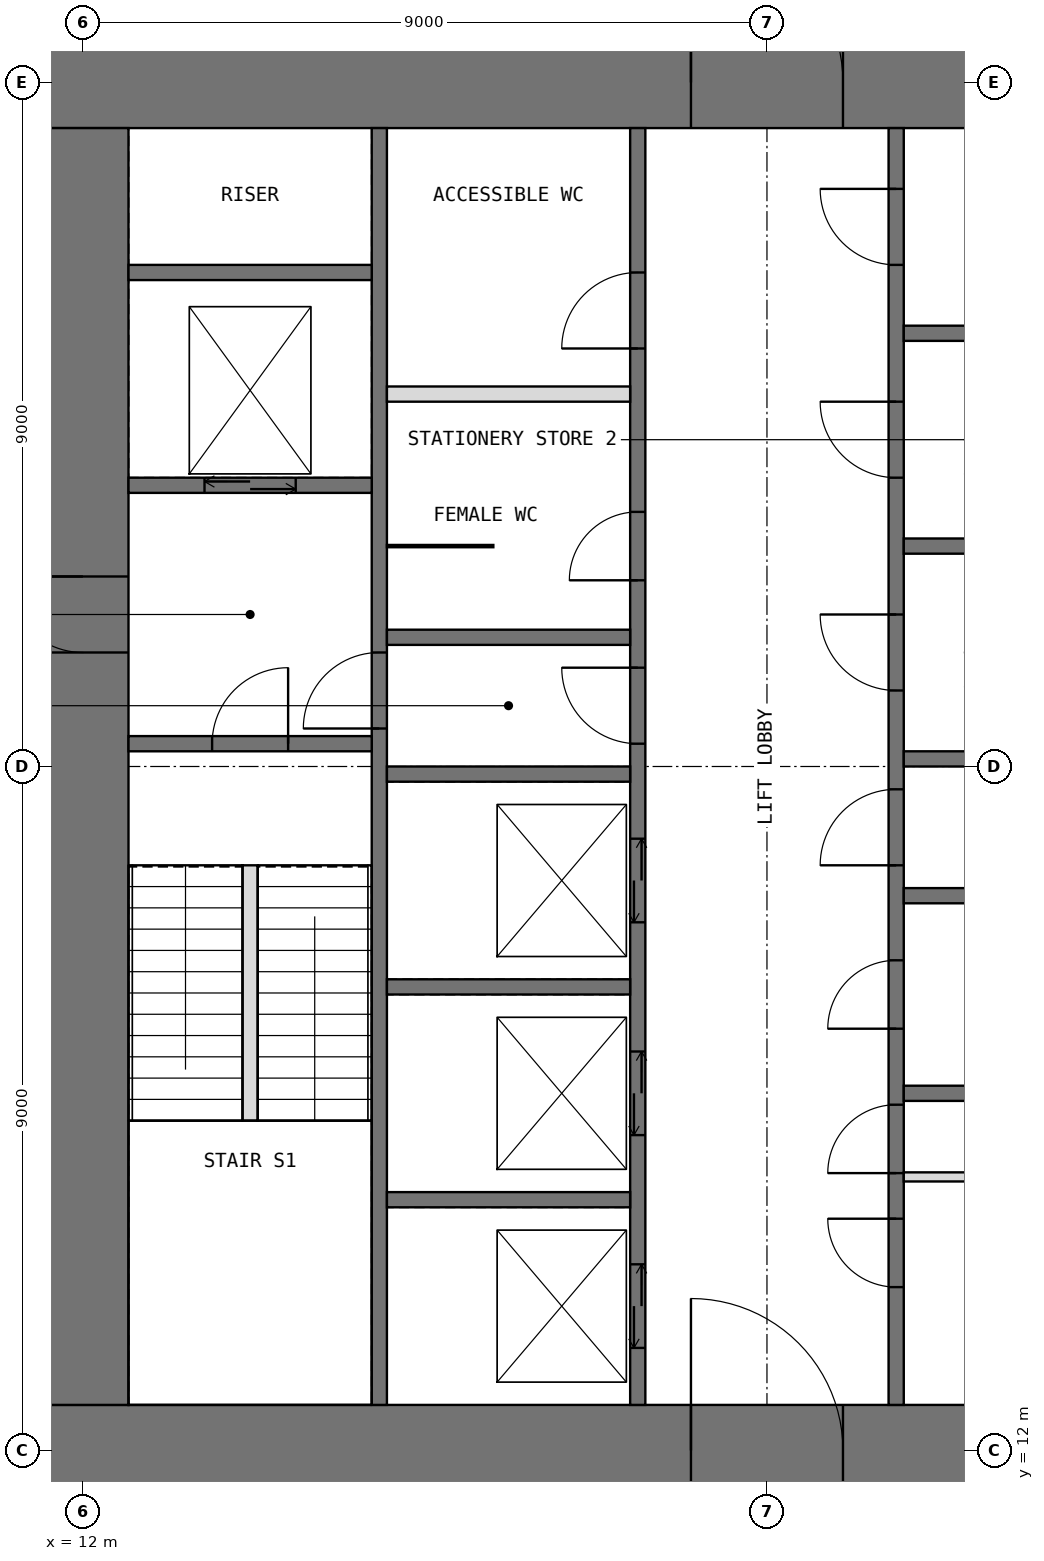
"""IFC4 building model, lengths in metres.
Left out: names, types, materials, properties, quantities, classifications, styles, units other than length and angle.
Written with IfcOpenShell. Run it as: python <this file> out.ifc"""

import sys

from ifc_helpers import new_model, si_unit, direction, frame, frame_2d, origin, place, context, subcontext, project, spatial, rectangle, extrude, element, fill, save


model = new_model("IFC4")
c1 = context("Model", 3, precision=1e-05, world=origin(), true_north=direction((0.0, 1.0)))
c2 = subcontext(c1, "Body", "Model", "MODEL_VIEW")
j1 = project(units=[si_unit("LENGTHUNIT", "METRE"), si_unit("PLANEANGLEUNIT", "RADIAN")], contexts=[c1])
p1 = place(None, origin())
s1 = spatial("IfcSite", under=j1, at=p1, CompositionType="ELEMENT")
p2 = place(p1, origin())
s2 = spatial("IfcBuilding", under=s1, at=p2, CompositionType="ELEMENT")
p3 = place(p2, frame((0.0, 0.0, 244.0)))
s3 = spatial("IfcBuildingStorey", under=s2, at=p3, CompositionType="ELEMENT", Elevation=244.0)
p4 = place(p3, frame((11.4, 12.0, -0.05), z_axis=(0.0, 0.0, 1.0), x_axis=(1.0, 0.0, 0.0)))
e1 = element("IfcWall", 1, at=p4, inside=s3, PredefinedType="SHEAR", context=c2, shape_type="SweptSolid", body=[
    extrude(rectangle(XDim=19.2, YDim=1.2, at=frame_2d((9.6, 0.0))), origin(), (0.0, 0.0, 1.0), 4.2),
])
p5 = place(p4, frame((8.6, 0.0, 0.05)))
e2 = element("IfcOpeningElement", 2, at=p5, cuts=e1, PredefinedType="OPENING", context=c2, shape_type="SweptSolid", body=[
    extrude(rectangle(XDim=2.0, YDim=2.2, at=frame_2d((1.0, 1.1))), frame((0.0, 0.61, 0.0), z_axis=(0.0, -1.0, 0.0), x_axis=(1.0, 0.0, 0.0)), (0.0, 0.0, 1.0), 1.22),
])
p6 = place(p3, frame((11.4, 30.0, -0.05), z_axis=(0.0, 0.0, 1.0), x_axis=(1.0, 0.0, 0.0)))
e3 = element("IfcWall", 3, at=p6, inside=s3, PredefinedType="SHEAR", context=c2, shape_type="SweptSolid", body=[
    extrude(rectangle(XDim=19.2, YDim=1.2, at=frame_2d((9.6, 0.0))), origin(), (0.0, 0.0, 1.0), 4.2),
])
p7 = place(p6, frame((8.6, 0.0, 0.05)))
e4 = element("IfcOpeningElement", 4, at=p7, cuts=e3, PredefinedType="OPENING", context=c2, shape_type="SweptSolid", body=[
    extrude(rectangle(XDim=2.0, YDim=2.2, at=frame_2d((1.0, 1.1))), frame((0.0, 0.61, 0.0), z_axis=(0.0, -1.0, 0.0), x_axis=(1.0, 0.0, 0.0)), (0.0, 0.0, 1.0), 1.22),
])
p8 = place(p3, frame((12.0, 12.6, -0.05), z_axis=(0.0, 0.0, 1.0), x_axis=(0.0, 1.0, 0.0)))
e5 = element("IfcWall", 5, at=p8, inside=s3, PredefinedType="SHEAR", context=c2, shape_type="SweptSolid", body=[
    extrude(rectangle(XDim=16.8, YDim=1.2, at=frame_2d((8.4, 0.0))), origin(), (0.0, 0.0, 1.0), 4.2),
])
p9 = place(p8, frame((9.9, 0.0, 0.05)))
e6 = element("IfcOpeningElement", 6, at=p9, cuts=e5, PredefinedType="OPENING", context=c2, shape_type="SweptSolid", body=[
    extrude(rectangle(XDim=1.0, YDim=2.2, at=frame_2d((0.5, 1.1))), frame((0.0, 0.61, 0.0), z_axis=(0.0, -1.0, 0.0), x_axis=(1.0, 0.0, 0.0)), (0.0, 0.0, 1.0), 1.22),
])
p10 = place(p3, frame((15.9, 12.6, -0.05), z_axis=(0.0, 0.0, 1.0), x_axis=(0.0, 1.0, 0.0)))
e7 = element("IfcWall", 7, at=p10, inside=s3, PredefinedType="SHEAR", context=c2, shape_type="SweptSolid", body=[
    extrude(rectangle(XDim=16.8, YDim=0.2, at=frame_2d((8.4, 0.0))), origin(), (0.0, 0.0, 1.0), 4.2),
])
p11 = place(p10, frame((8.9, 0.0, 0.05)))
e8 = element("IfcOpeningElement", 8, at=p11, cuts=e7, PredefinedType="OPENING", context=c2, shape_type="SweptSolid", body=[
    extrude(rectangle(XDim=1.0, YDim=2.2, at=frame_2d((0.5, 1.1))), frame((0.0, 0.11, 0.0), z_axis=(0.0, -1.0, 0.0), x_axis=(1.0, 0.0, 0.0)), (0.0, 0.0, 1.0), 0.22),
])
p12 = place(p3, frame((19.3, 12.6, -0.05), z_axis=(0.0, 0.0, 1.0), x_axis=(0.0, 1.0, 0.0)))
e9 = element("IfcWall", 9, at=p12, inside=s3, PredefinedType="SHEAR", context=c2, shape_type="SweptSolid", body=[
    extrude(rectangle(XDim=16.8, YDim=0.2, at=frame_2d((8.4, 0.0))), origin(), (0.0, 0.0, 1.0), 4.2),
])
p13 = place(p12, frame((8.7, 0.0, 0.05)))
e10 = element("IfcOpeningElement", 10, at=p13, cuts=e9, PredefinedType="OPENING", context=c2, shape_type="SweptSolid", body=[
    extrude(rectangle(XDim=1.0, YDim=2.2, at=frame_2d((0.5, 1.1))), frame((0.0, 0.11, 0.0), z_axis=(0.0, -1.0, 0.0), x_axis=(1.0, 0.0, 0.0)), (0.0, 0.0, 1.0), 0.22),
])
p14 = place(p12, frame((10.85, 0.0, 0.05)))
e11 = element("IfcOpeningElement", 11, at=p14, cuts=e9, PredefinedType="OPENING", context=c2, shape_type="SweptSolid", body=[
    extrude(rectangle(XDim=0.9, YDim=2.2, at=frame_2d((0.45, 1.1))), frame((0.0, 0.11, 0.0), z_axis=(0.0, -1.0, 0.0), x_axis=(1.0, 0.0, 0.0)), (0.0, 0.0, 1.0), 0.22),
])
p15 = place(p12, frame((13.9, 0.0, 0.05)))
e12 = element("IfcOpeningElement", 12, at=p15, cuts=e9, PredefinedType="OPENING", context=c2, shape_type="SweptSolid", body=[
    extrude(rectangle(XDim=1.0, YDim=2.2, at=frame_2d((0.5, 1.1))), frame((0.0, 0.11, 0.0), z_axis=(0.0, -1.0, 0.0), x_axis=(1.0, 0.0, 0.0)), (0.0, 0.0, 1.0), 0.22),
])
p16 = place(p12, frame((0.75, 0.0, 0.05)))
e13 = element("IfcOpeningElement", 13, at=p16, cuts=e9, PredefinedType="OPENING", context=c2, shape_type="SweptSolid", body=[
    extrude(rectangle(XDim=1.1, YDim=2.2, at=frame_2d((0.55, 1.1))), frame((0.0, 0.11, 0.0), z_axis=(0.0, -1.0, 0.0), x_axis=(1.0, 0.0, 0.0)), (0.0, 0.0, 1.0), 0.22),
])
p17 = place(p12, frame((3.55, 0.0, 0.05)))
e14 = element("IfcOpeningElement", 14, at=p17, cuts=e9, PredefinedType="OPENING", context=c2, shape_type="SweptSolid", body=[
    extrude(rectangle(XDim=1.1, YDim=2.2, at=frame_2d((0.55, 1.1))), frame((0.0, 0.11, 0.0), z_axis=(0.0, -1.0, 0.0), x_axis=(1.0, 0.0, 0.0)), (0.0, 0.0, 1.0), 0.22),
])
p18 = place(p12, frame((6.35, 0.0, 0.05)))
e15 = element("IfcOpeningElement", 15, at=p18, cuts=e9, PredefinedType="OPENING", context=c2, shape_type="SweptSolid", body=[
    extrude(rectangle(XDim=1.1, YDim=2.2, at=frame_2d((0.55, 1.1))), frame((0.0, 0.11, 0.0), z_axis=(0.0, -1.0, 0.0), x_axis=(1.0, 0.0, 0.0)), (0.0, 0.0, 1.0), 0.22),
])
p19 = place(p3, frame((22.7, 12.6, -0.05), z_axis=(0.0, 0.0, 1.0), x_axis=(0.0, 1.0, 0.0)))
e16 = element("IfcWall", 16, at=p19, inside=s3, PredefinedType="SHEAR", context=c2, shape_type="SweptSolid", body=[
    extrude(rectangle(XDim=16.8, YDim=0.2, at=frame_2d((8.4, 0.0))), origin(), (0.0, 0.0, 1.0), 4.2),
])
p20 = place(p19, frame((3.05, 0.0, 0.05)))
e17 = element("IfcOpeningElement", 17, at=p20, cuts=e16, PredefinedType="OPENING", context=c2, shape_type="SweptSolid", body=[
    extrude(rectangle(XDim=0.9, YDim=2.2, at=frame_2d((0.45, 1.1))), frame((0.0, 0.11, 0.0), z_axis=(0.0, -1.0, 0.0), x_axis=(1.0, 0.0, 0.0)), (0.0, 0.0, 1.0), 0.22),
])
p21 = place(p19, frame((7.1, 0.0, 0.05)))
e18 = element("IfcOpeningElement", 18, at=p21, cuts=e16, PredefinedType="OPENING", context=c2, shape_type="SweptSolid", body=[
    extrude(rectangle(XDim=1.0, YDim=2.2, at=frame_2d((0.5, 1.1))), frame((0.0, 0.11, 0.0), z_axis=(0.0, -1.0, 0.0), x_axis=(1.0, 0.0, 0.0)), (0.0, 0.0, 1.0), 0.22),
])
p22 = place(p19, frame((1.55, 0.0, 0.05)))
e19 = element("IfcOpeningElement", 19, at=p22, cuts=e16, PredefinedType="OPENING", context=c2, shape_type="SweptSolid", body=[
    extrude(rectangle(XDim=0.9, YDim=2.2, at=frame_2d((0.45, 1.1))), frame((0.0, 0.11, 0.0), z_axis=(0.0, -1.0, 0.0), x_axis=(1.0, 0.0, 0.0)), (0.0, 0.0, 1.0), 0.22),
])
p23 = place(p19, frame((4.95, 0.0, 0.05)))
e20 = element("IfcOpeningElement", 20, at=p23, cuts=e16, PredefinedType="OPENING", context=c2, shape_type="SweptSolid", body=[
    extrude(rectangle(XDim=0.9, YDim=2.2, at=frame_2d((0.45, 1.1))), frame((0.0, 0.11, 0.0), z_axis=(0.0, -1.0, 0.0), x_axis=(1.0, 0.0, 0.0)), (0.0, 0.0, 1.0), 0.22),
])
p24 = place(p19, frame((9.4, 0.0, 0.05)))
e21 = element("IfcOpeningElement", 21, at=p24, cuts=e16, PredefinedType="OPENING", context=c2, shape_type="SweptSolid", body=[
    extrude(rectangle(XDim=1.0, YDim=2.2, at=frame_2d((0.5, 1.1))), frame((0.0, 0.11, 0.0), z_axis=(0.0, -1.0, 0.0), x_axis=(1.0, 0.0, 0.0)), (0.0, 0.0, 1.0), 0.22),
])
p25 = place(p19, frame((12.2, 0.0, 0.05)))
e22 = element("IfcOpeningElement", 22, at=p25, cuts=e16, PredefinedType="OPENING", context=c2, shape_type="SweptSolid", body=[
    extrude(rectangle(XDim=1.0, YDim=2.2, at=frame_2d((0.5, 1.1))), frame((0.0, 0.11, 0.0), z_axis=(0.0, -1.0, 0.0), x_axis=(1.0, 0.0, 0.0)), (0.0, 0.0, 1.0), 0.22),
])
p26 = place(p19, frame((15.0, 0.0, 0.05)))
e23 = element("IfcOpeningElement", 23, at=p26, cuts=e16, PredefinedType="OPENING", context=c2, shape_type="SweptSolid", body=[
    extrude(rectangle(XDim=1.0, YDim=2.2, at=frame_2d((0.5, 1.1))), frame((0.0, 0.11, 0.0), z_axis=(0.0, -1.0, 0.0), x_axis=(1.0, 0.0, 0.0)), (0.0, 0.0, 1.0), 0.22),
])
p27 = place(p3, frame((12.6, 21.3, -0.05), z_axis=(0.0, 0.0, 1.0), x_axis=(1.0, 0.0, 0.0)))
e24 = element("IfcWall", 24, at=p27, inside=s3, PredefinedType="SHEAR", context=c2, shape_type="SweptSolid", body=[
    extrude(rectangle(XDim=3.2, YDim=0.2, at=frame_2d((1.6, 0.0))), origin(), (0.0, 0.0, 1.0), 4.2),
])
p28 = place(p27, frame((1.1, 0.0, 0.05)))
e25 = element("IfcOpeningElement", 25, at=p28, cuts=e24, PredefinedType="OPENING", context=c2, shape_type="SweptSolid", body=[
    extrude(rectangle(XDim=1.0, YDim=2.2, at=frame_2d((0.5, 1.1))), frame((0.0, 0.11, 0.0), z_axis=(0.0, -1.0, 0.0), x_axis=(1.0, 0.0, 0.0)), (0.0, 0.0, 1.0), 0.22),
])
p29 = place(p3, frame((12.6, 24.7, -0.05), z_axis=(0.0, 0.0, 1.0), x_axis=(1.0, 0.0, 0.0)))
e26 = element("IfcWall", 26, at=p29, inside=s3, PredefinedType="SHEAR", context=c2, shape_type="SweptSolid", body=[
    extrude(rectangle(XDim=3.2, YDim=0.2, at=frame_2d((1.6, 0.0))), origin(), (0.0, 0.0, 1.0), 4.2),
])
p30 = place(p29, frame((1.0, 0.0, 0.05)))
e27 = element("IfcOpeningElement", 27, at=p30, cuts=e26, PredefinedType="OPENING", context=c2, shape_type="SweptSolid", body=[
    extrude(rectangle(XDim=1.2, YDim=2.2, at=frame_2d((0.6, 1.1))), frame((0.0, 0.11, 0.0), z_axis=(0.0, -1.0, 0.0), x_axis=(1.0, 0.0, 0.0)), (0.0, 0.0, 1.0), 0.22),
])
for number, where, z_axis, x_axis in (
    (28, (12.6, 27.5, -0.05), (0.0, 0.0, 1.0), (1.0, 0.0, 0.0)),
    (29, (16.0, 15.3, -0.05), (0.0, 0.0, 1.0), (1.0, 0.0, 0.0)),
    (30, (16.0, 18.1, -0.05), (0.0, 0.0, 1.0), (1.0, 0.0, 0.0)),
    (31, (16.0, 20.9, -0.05), (0.0, 0.0, 1.0), (1.0, 0.0, 0.0)),
    (32, (16.0, 22.7, -0.05), (0.0, 0.0, 1.0), (1.0, 0.0, 0.0)),
):
    element("IfcWall", number, at=place(p3, frame(where, z_axis=z_axis, x_axis=x_axis)), inside=s3, PredefinedType="SHEAR", context=c2, shape_type="SweptSolid", body=[
        extrude(rectangle(XDim=3.2, YDim=0.2, at=frame_2d((1.6, 0.0))), origin(), (0.0, 0.0, 1.0), 4.2),
    ])
p31 = place(p3, frame((16.0, 25.9, 0.0), z_axis=(0.0, 0.0, 1.0), x_axis=(1.0, 0.0, 0.0)))
e33 = element("IfcWall", 33, at=p31, inside=s3, PredefinedType="PARTITIONING", context=c2, shape_type="SweptSolid", body=[
    extrude(rectangle(XDim=3.2, YDim=0.2, at=frame_2d((1.6, 0.0))), origin(), (0.0, 0.0, 1.0), 3.95),
])
for number, where, z_axis, x_axis in (
    (34, (22.8, 16.7, -0.05), (0.0, 0.0, 1.0), (1.0, 0.0, 0.0)),
    (35, (22.8, 19.3, -0.05), (0.0, 0.0, 1.0), (1.0, 0.0, 0.0)),
    (36, (22.8, 21.1, -0.05), (0.0, 0.0, 1.0), (1.0, 0.0, 0.0)),
    (37, (22.8, 23.9, -0.05), (0.0, 0.0, 1.0), (1.0, 0.0, 0.0)),
    (38, (22.8, 26.7, -0.05), (0.0, 0.0, 1.0), (1.0, 0.0, 0.0)),
):
    element("IfcWall", number, at=place(p3, frame(where, z_axis=z_axis, x_axis=x_axis)), inside=s3, PredefinedType="SHEAR", context=c2, shape_type="SweptSolid", body=[
        extrude(rectangle(XDim=3.2, YDim=0.2, at=frame_2d((1.6, 0.0))), origin(), (0.0, 0.0, 1.0), 4.2),
    ])
p32 = place(p3, frame((22.8, 15.6, 0.0), z_axis=(0.0, 0.0, 1.0), x_axis=(1.0, 0.0, 0.0)))
e39 = element("IfcWall", 39, at=p32, inside=s3, PredefinedType="PARTITIONING", context=c2, shape_type="SweptSolid", body=[
    extrude(rectangle(XDim=3.2, YDim=0.12, at=frame_2d((1.6, 0.0))), origin(), (0.0, 0.0, 1.0), 3.95),
])
p33 = place(p3, frame((16.0, 23.9, 0.0), z_axis=(0.0, 0.0, 1.0), x_axis=(1.0, 0.0, 0.0)))
e40 = element("IfcWall", 40, at=p33, inside=s3, PredefinedType="PARTITIONING", context=c2, shape_type="SweptSolid", body=[
    extrude(rectangle(XDim=1.4, YDim=0.03, at=frame_2d((0.7, 0.0))), origin(), (0.0, 0.0, 1.0), 3.95),
])
p34 = place(p3, frame((14.2, 16.34, 0.0), z_axis=(0.0, 0.0, 1.0), x_axis=(0.0, 1.0, 0.0)))
e41 = element("IfcWall", 41, at=p34, inside=s3, PredefinedType="PARTITIONING", context=c2, shape_type="SweptSolid", body=[
    extrude(rectangle(XDim=3.36, YDim=0.2, at=frame_2d((1.68, 0.0))), origin(), (0.0, 0.0, 1.0), 4.2),
])
p35 = place(p5, origin())
e42 = element("IfcDoor", 42, at=p35, inside=s3, OperationType="DOUBLE_DOOR_SINGLE_SWING", PredefinedType="DOOR", context=c2, shape_type="SweptSolid", body=[
    extrude(rectangle(XDim=2.0, YDim=2.2, at=frame_2d((1.0, 1.1))), frame((0.0, 0.025, 0.0), z_axis=(0.0, -1.0, 0.0), x_axis=(1.0, 0.0, 0.0)), (0.0, 0.0, 1.0), 0.05),
])
fill(e2, e42)
p36 = place(p7, origin())
e43 = element("IfcDoor", 43, at=p36, inside=s3, OperationType="DOUBLE_DOOR_SINGLE_SWING", PredefinedType="DOOR", context=c2, shape_type="SweptSolid", body=[
    extrude(rectangle(XDim=2.0, YDim=2.2, at=frame_2d((1.0, 1.1))), frame((0.0, 0.025, 0.0), z_axis=(0.0, -1.0, 0.0), x_axis=(1.0, 0.0, 0.0)), (0.0, 0.0, 1.0), 0.05),
])
fill(e4, e43)
p37 = place(p20, origin())
e44 = element("IfcDoor", 44, at=p37, inside=s3, OperationType="SINGLE_SWING_LEFT", PredefinedType="DOOR", context=c2, shape_type="SweptSolid", body=[
    extrude(rectangle(XDim=0.9, YDim=2.2, at=frame_2d((0.45, 1.1))), frame((0.0, 0.025, 0.0), z_axis=(0.0, -1.0, 0.0), x_axis=(1.0, 0.0, 0.0)), (0.0, 0.0, 1.0), 0.05),
])
fill(e17, e44)
p38 = place(p9, origin())
e45 = element("IfcDoor", 45, at=p38, inside=s3, OperationType="SINGLE_SWING_RIGHT", PredefinedType="DOOR", context=c2, shape_type="SweptSolid", body=[
    extrude(rectangle(XDim=1.0, YDim=2.2, at=frame_2d((0.5, 1.1))), frame((0.0, 0.025, 0.0), z_axis=(0.0, -1.0, 0.0), x_axis=(1.0, 0.0, 0.0)), (0.0, 0.0, 1.0), 0.05),
])
fill(e6, e45)
p39 = place(p28, origin())
e46 = element("IfcDoor", 46, at=p39, inside=s3, OperationType="SINGLE_SWING_RIGHT", PredefinedType="DOOR", context=c2, shape_type="SweptSolid", body=[
    extrude(rectangle(XDim=1.0, YDim=2.2, at=frame_2d((0.5, 1.1))), frame((0.0, 0.025, 0.0), z_axis=(0.0, -1.0, 0.0), x_axis=(1.0, 0.0, 0.0)), (0.0, 0.0, 1.0), 0.05),
])
fill(e25, e46)
p40 = place(p11, origin())
e47 = element("IfcDoor", 47, at=p40, inside=s3, OperationType="SINGLE_SWING_LEFT", PredefinedType="DOOR", context=c2, shape_type="SweptSolid", body=[
    extrude(rectangle(XDim=1.0, YDim=2.2, at=frame_2d((0.5, 1.1))), frame((0.0, 0.025, 0.0), z_axis=(0.0, -1.0, 0.0), x_axis=(1.0, 0.0, 0.0)), (0.0, 0.0, 1.0), 0.05),
])
fill(e8, e47)
p41 = place(p13, origin())
e48 = element("IfcDoor", 48, at=p41, inside=s3, OperationType="SINGLE_SWING_RIGHT", PredefinedType="DOOR", context=c2, shape_type="SweptSolid", body=[
    extrude(rectangle(XDim=1.0, YDim=2.2, at=frame_2d((0.5, 1.1))), frame((0.0, 0.025, 0.0), z_axis=(0.0, -1.0, 0.0), x_axis=(1.0, 0.0, 0.0)), (0.0, 0.0, 1.0), 0.05),
])
fill(e10, e48)
p42 = place(p21, origin())
e49 = element("IfcDoor", 49, at=p42, inside=s3, OperationType="SINGLE_SWING_LEFT", PredefinedType="DOOR", context=c2, shape_type="SweptSolid", body=[
    extrude(rectangle(XDim=1.0, YDim=2.2, at=frame_2d((0.5, 1.1))), frame((0.0, 0.025, 0.0), z_axis=(0.0, -1.0, 0.0), x_axis=(1.0, 0.0, 0.0)), (0.0, 0.0, 1.0), 0.05),
])
fill(e18, e49)
p43 = place(p14, origin())
e50 = element("IfcDoor", 50, at=p43, inside=s3, OperationType="SINGLE_SWING_LEFT", PredefinedType="DOOR", context=c2, shape_type="SweptSolid", body=[
    extrude(rectangle(XDim=0.9, YDim=2.2, at=frame_2d((0.45, 1.1))), frame((0.0, 0.025, 0.0), z_axis=(0.0, -1.0, 0.0), x_axis=(1.0, 0.0, 0.0)), (0.0, 0.0, 1.0), 0.05),
])
fill(e11, e50)
p44 = place(p15, origin())
e51 = element("IfcDoor", 51, at=p44, inside=s3, OperationType="SINGLE_SWING_LEFT", PredefinedType="DOOR", context=c2, shape_type="SweptSolid", body=[
    extrude(rectangle(XDim=1.0, YDim=2.2, at=frame_2d((0.5, 1.1))), frame((0.0, 0.025, 0.0), z_axis=(0.0, -1.0, 0.0), x_axis=(1.0, 0.0, 0.0)), (0.0, 0.0, 1.0), 0.05),
])
fill(e12, e51)
p45 = place(p22, origin())
e52 = element("IfcDoor", 52, at=p45, inside=s3, OperationType="SINGLE_SWING_RIGHT", PredefinedType="DOOR", context=c2, shape_type="SweptSolid", body=[
    extrude(rectangle(XDim=0.9, YDim=2.2, at=frame_2d((0.45, 1.1))), frame((0.0, 0.025, 0.0), z_axis=(0.0, -1.0, 0.0), x_axis=(1.0, 0.0, 0.0)), (0.0, 0.0, 1.0), 0.05),
])
fill(e19, e52)
p46 = place(p23, origin())
e53 = element("IfcDoor", 53, at=p46, inside=s3, OperationType="SINGLE_SWING_LEFT", PredefinedType="DOOR", context=c2, shape_type="SweptSolid", body=[
    extrude(rectangle(XDim=0.9, YDim=2.2, at=frame_2d((0.45, 1.1))), frame((0.0, 0.025, 0.0), z_axis=(0.0, -1.0, 0.0), x_axis=(1.0, 0.0, 0.0)), (0.0, 0.0, 1.0), 0.05),
])
fill(e20, e53)
p47 = place(p24, origin())
e54 = element("IfcDoor", 54, at=p47, inside=s3, OperationType="SINGLE_SWING_RIGHT", PredefinedType="DOOR", context=c2, shape_type="SweptSolid", body=[
    extrude(rectangle(XDim=1.0, YDim=2.2, at=frame_2d((0.5, 1.1))), frame((0.0, 0.025, 0.0), z_axis=(0.0, -1.0, 0.0), x_axis=(1.0, 0.0, 0.0)), (0.0, 0.0, 1.0), 0.05),
])
fill(e21, e54)
p48 = place(p25, origin())
e55 = element("IfcDoor", 55, at=p48, inside=s3, OperationType="SINGLE_SWING_RIGHT", PredefinedType="DOOR", context=c2, shape_type="SweptSolid", body=[
    extrude(rectangle(XDim=1.0, YDim=2.2, at=frame_2d((0.5, 1.1))), frame((0.0, 0.025, 0.0), z_axis=(0.0, -1.0, 0.0), x_axis=(1.0, 0.0, 0.0)), (0.0, 0.0, 1.0), 0.05),
])
fill(e22, e55)
p49 = place(p26, origin())
e56 = element("IfcDoor", 56, at=p49, inside=s3, OperationType="SINGLE_SWING_RIGHT", PredefinedType="DOOR", context=c2, shape_type="SweptSolid", body=[
    extrude(rectangle(XDim=1.0, YDim=2.2, at=frame_2d((0.5, 1.1))), frame((0.0, 0.025, 0.0), z_axis=(0.0, -1.0, 0.0), x_axis=(1.0, 0.0, 0.0)), (0.0, 0.0, 1.0), 0.05),
])
fill(e23, e56)
p50 = place(p16, origin())
e57 = element("IfcDoor", 57, at=p50, inside=s3, OperationType="DOUBLE_DOOR_SLIDING", PredefinedType="DOOR", context=c2, shape_type="SweptSolid", body=[
    extrude(rectangle(XDim=1.1, YDim=2.2, at=frame_2d((0.55, 1.1))), frame((0.0, 0.025, 0.0), z_axis=(0.0, -1.0, 0.0), x_axis=(1.0, 0.0, 0.0)), (0.0, 0.0, 1.0), 0.05),
])
fill(e13, e57)
p51 = place(p17, origin())
e58 = element("IfcDoor", 58, at=p51, inside=s3, OperationType="DOUBLE_DOOR_SLIDING", PredefinedType="DOOR", context=c2, shape_type="SweptSolid", body=[
    extrude(rectangle(XDim=1.1, YDim=2.2, at=frame_2d((0.55, 1.1))), frame((0.0, 0.025, 0.0), z_axis=(0.0, -1.0, 0.0), x_axis=(1.0, 0.0, 0.0)), (0.0, 0.0, 1.0), 0.05),
])
fill(e14, e58)
p52 = place(p18, origin())
e59 = element("IfcDoor", 59, at=p52, inside=s3, OperationType="DOUBLE_DOOR_SLIDING", PredefinedType="DOOR", context=c2, shape_type="SweptSolid", body=[
    extrude(rectangle(XDim=1.1, YDim=2.2, at=frame_2d((0.55, 1.1))), frame((0.0, 0.025, 0.0), z_axis=(0.0, -1.0, 0.0), x_axis=(1.0, 0.0, 0.0)), (0.0, 0.0, 1.0), 0.05),
])
fill(e15, e59)
p53 = place(p30, origin())
e60 = element("IfcDoor", 60, at=p53, inside=s3, OperationType="DOUBLE_DOOR_SLIDING", PredefinedType="DOOR", context=c2, shape_type="SweptSolid", body=[
    extrude(rectangle(XDim=1.2, YDim=2.2, at=frame_2d((0.6, 1.1))), frame((0.0, 0.025, 0.0), z_axis=(0.0, -1.0, 0.0), x_axis=(1.0, 0.0, 0.0)), (0.0, 0.0, 1.0), 0.05),
])
fill(e27, e60)
save(model, sys.argv[1])
